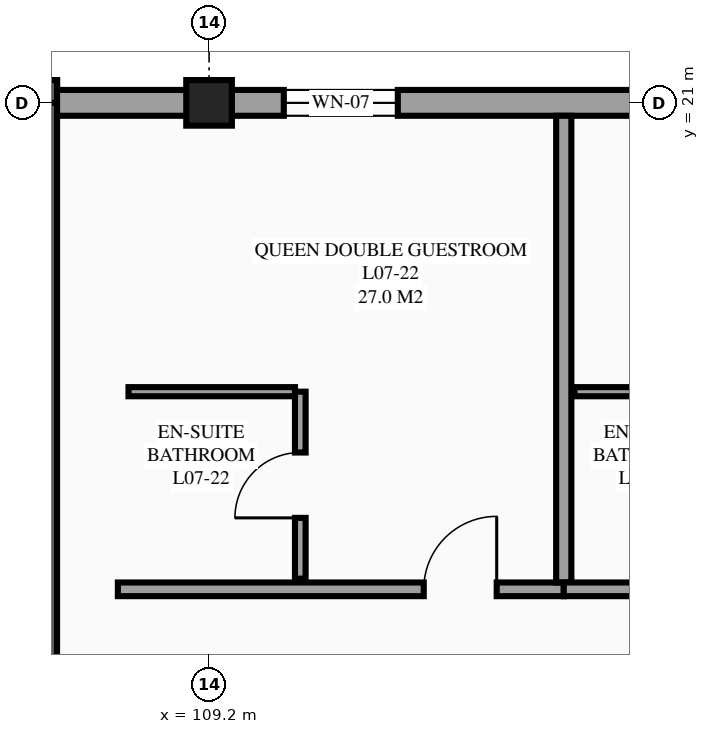
"""IFC4 building model, lengths in metres.
Left out: names, types, materials, properties, quantities, classifications, styles, units other than length and angle.
Written with IfcOpenShell. Run it as: python <this file> out.ifc"""

import sys

from ifc_helpers import new_model, si_unit, direction, frame, frame_2d, origin, origin_2d, place, context, subcontext, project, spatial, rectangle, extrude, element, fill, save


model = new_model("IFC4")
c1 = context("Model", 3, precision=1e-05, world=origin(), true_north=direction((0.0, 1.0)))
c2 = subcontext(c1, "Body", "Model", "MODEL_VIEW")
j1 = project(units=[si_unit("LENGTHUNIT", "METRE"), si_unit("PLANEANGLEUNIT", "RADIAN")], contexts=[c1])
p1 = place(None, origin())
s1 = spatial("IfcSite", under=j1, at=p1, CompositionType="ELEMENT")
p2 = place(p1, origin())
s2 = spatial("IfcBuilding", under=s1, at=p2, CompositionType="ELEMENT")
p3 = place(p2, frame((0.0, 0.0, 29.1)))
s3 = spatial("IfcBuildingStorey", under=s2, at=p3, CompositionType="ELEMENT", Elevation=29.1)
p4 = place(p3, frame((109.2, 21.0, 0.0), z_axis=(0.0, 0.0, 1.0), x_axis=(1.0, 0.0, 0.0)))
e1 = element("IfcColumn", 1, at=p4, inside=s3, PredefinedType="COLUMN", context=c2, shape_type="SweptSolid", body=[
    extrude(rectangle(XDim=0.6, YDim=0.6, at=origin_2d()), origin(), (0.0, 0.0, 1.0), 3.6),
])
p5 = place(p3, frame((126.0, 21.0, 0.0), z_axis=(0.0, 0.0, 1.0), x_axis=(-1.0, 0.0, 0.0)))
e2 = element("IfcWall", 2, at=p5, inside=s3, PredefinedType="STANDARD", context=c2, shape_type="SweptSolid", body=[
    extrude(rectangle(XDim=16.8, YDim=0.34, at=frame_2d((8.4, 0.0))), origin(), (0.0, 0.0, 1.0), 2.63),
])
p6 = place(p5, frame((14.317, 0.0, 0.85)))
e3 = element("IfcOpeningElement", 3, at=p6, cuts=e2, PredefinedType="OPENING", context=c2, shape_type="SweptSolid", body=[
    extrude(rectangle(XDim=1.5, YDim=1.5, at=frame_2d((0.75, 0.75))), frame((0.0, 0.18, 0.0), z_axis=(0.0, -1.0, 0.0), x_axis=(1.0, 0.0, 0.0)), (0.0, 0.0, 1.0), 0.36),
])
p7 = place(p5, frame((9.2, 0.0, 0.85)))
e4 = element("IfcOpeningElement", 4, at=p7, cuts=e2, PredefinedType="OPENING", context=c2, shape_type="SweptSolid", body=[
    extrude(rectangle(XDim=1.5, YDim=1.5, at=frame_2d((0.75, 0.75))), frame((0.0, 0.18, 0.0), z_axis=(0.0, -1.0, 0.0), x_axis=(1.0, 0.0, 0.0)), (0.0, 0.0, 1.0), 0.36),
])
p8 = place(p5, frame((2.583, 0.0, 0.85)))
e5 = element("IfcOpeningElement", 5, at=p8, cuts=e2, PredefinedType="OPENING", context=c2, shape_type="SweptSolid", body=[
    extrude(rectangle(XDim=1.5, YDim=1.5, at=frame_2d((0.75, 0.75))), frame((0.0, 0.18, 0.0), z_axis=(0.0, -1.0, 0.0), x_axis=(1.0, 0.0, 0.0)), (0.0, 0.0, 1.0), 0.36),
])
p9 = place(p3, frame((107.05, 12.46, 0.0), z_axis=(0.0, 0.0, 1.0), x_axis=(0.0, 1.0, 0.0)))
e6 = element("IfcWall", 6, at=p9, inside=s3, PredefinedType="SHEAR", context=c2, shape_type="SweptSolid", body=[
    extrude(rectangle(XDim=8.84, YDim=0.3, at=frame_2d((4.42, 0.0))), origin(), (0.0, 0.0, 1.0), 3.6),
])
p10 = place(p3, frame((107.2, 21.15, 0.0), z_axis=(0.0, 0.0, 1.0), x_axis=(-1.0, 0.0, 0.0)))
e7 = element("IfcWall", 7, at=p10, inside=s3, PredefinedType="SHEAR", context=c2, shape_type="SweptSolid", body=[
    extrude(rectangle(XDim=5.2, YDim=0.3, at=frame_2d((2.6, 0.0))), origin(), (0.0, 0.0, 1.0), 3.6),
])
p11 = place(p3, frame((108.0, 14.6, 0.0), z_axis=(0.0, 0.0, 1.0), x_axis=(1.0, 0.0, 0.0)))
e8 = element("IfcWall", 8, at=p11, inside=s3, PredefinedType="PARTITIONING", context=c2, shape_type="SweptSolid", body=[
    extrude(rectangle(XDim=5.867, YDim=0.18, at=frame_2d((2.933, 0.0))), origin(), (0.0, 0.0, 1.0), 3.375),
])
p12 = place(p11, frame((4.024, 0.0, 0.0)))
e9 = element("IfcOpeningElement", 9, at=p12, cuts=e8, PredefinedType="OPENING", context=c2, shape_type="SweptSolid", body=[
    extrude(rectangle(XDim=0.96, YDim=2.15, at=frame_2d((0.48, 1.075))), frame((0.0, 0.1, 0.0), z_axis=(0.0, -1.0, 0.0), x_axis=(1.0, 0.0, 0.0)), (0.0, 0.0, 1.0), 0.2),
])
p13 = place(p3, frame((113.867, 14.69, 0.0), z_axis=(0.0, 0.0, 1.0), x_axis=(0.0, 1.0, 0.0)))
e10 = element("IfcWall", 10, at=p13, inside=s3, PredefinedType="PARTITIONING", context=c2, shape_type="SweptSolid", body=[
    extrude(rectangle(XDim=6.14, YDim=0.2, at=frame_2d((3.07, 0.0))), origin(), (0.0, 0.0, 1.0), 3.375),
])
p14 = place(p3, frame((110.4, 14.74, 0.0), z_axis=(0.0, 0.0, 1.0), x_axis=(0.0, 1.0, 0.0)))
e11 = element("IfcWall", 11, at=p14, inside=s3, PredefinedType="PARTITIONING", context=c2, shape_type="SweptSolid", body=[
    extrude(rectangle(XDim=2.46, YDim=0.14, at=frame_2d((1.23, 0.0))), origin(), (0.0, 0.0, 1.0), 3.375),
])
p15 = place(p14, frame((0.8, 0.0, 0.0)))
e12 = element("IfcOpeningElement", 12, at=p15, cuts=e11, PredefinedType="OPENING", context=c2, shape_type="SweptSolid", body=[
    extrude(rectangle(XDim=0.86, YDim=2.1, at=frame_2d((0.43, 1.05))), frame((0.0, 0.08, 0.0), z_axis=(0.0, -1.0, 0.0), x_axis=(1.0, 0.0, 0.0)), (0.0, 0.0, 1.0), 0.16),
])
p16 = place(p3, frame((108.14, 17.2, 0.0), z_axis=(0.0, 0.0, 1.0), x_axis=(1.0, 0.0, 0.0)))
e13 = element("IfcWall", 13, at=p16, inside=s3, PredefinedType="PARTITIONING", context=c2, shape_type="SweptSolid", body=[
    extrude(rectangle(XDim=2.19, YDim=0.12, at=frame_2d((1.095, 0.0))), origin(), (0.0, 0.0, 1.0), 3.375),
])
p17 = place(p3, frame((113.867, 14.6, 0.0), z_axis=(0.0, 0.0, 1.0), x_axis=(1.0, 0.0, 0.0)))
e14 = element("IfcWall", 14, at=p17, inside=s3, PredefinedType="PARTITIONING", context=c2, shape_type="SweptSolid", body=[
    extrude(rectangle(XDim=5.867, YDim=0.18, at=frame_2d((2.933, 0.0))), origin(), (0.0, 0.0, 1.0), 3.375),
])
p18 = place(p17, frame((4.024, 0.0, 0.0)))
e15 = element("IfcOpeningElement", 15, at=p18, cuts=e14, PredefinedType="OPENING", context=c2, shape_type="SweptSolid", body=[
    extrude(rectangle(XDim=0.96, YDim=2.15, at=frame_2d((0.48, 1.075))), frame((0.0, 0.1, 0.0), z_axis=(0.0, -1.0, 0.0), x_axis=(1.0, 0.0, 0.0)), (0.0, 0.0, 1.0), 0.2),
])
p19 = place(p3, frame((114.007, 17.2, 0.0), z_axis=(0.0, 0.0, 1.0), x_axis=(1.0, 0.0, 0.0)))
e16 = element("IfcWall", 16, at=p19, inside=s3, PredefinedType="PARTITIONING", context=c2, shape_type="SweptSolid", body=[
    extrude(rectangle(XDim=2.19, YDim=0.12, at=frame_2d((1.095, 0.0))), origin(), (0.0, 0.0, 1.0), 3.375),
])
p20 = place(p3, frame((109.2, 21.0, 0.0), z_axis=(0.0, 0.0, 1.0), x_axis=(-1.0, 0.0, 0.0)))
e17 = element("IfcWall", 17, at=p20, inside=s3, PredefinedType="STANDARD", context=c2, shape_type="SweptSolid", body=[
    extrude(rectangle(XDim=2.0, YDim=0.34, at=frame_2d((1.0, 0.0))), origin(), (0.0, 0.0, 1.0), 3.126),
])
p21 = place(p6, origin())
e18 = element("IfcWindow", 18, at=p21, inside=s3, PartitioningType="SINGLE_PANEL", PredefinedType="WINDOW", context=c2, shape_type="SweptSolid", body=[
    extrude(rectangle(XDim=1.5, YDim=1.5, at=frame_2d((0.75, 0.75))), frame((0.0, 0.03, 0.0), z_axis=(0.0, -1.0, 0.0), x_axis=(1.0, 0.0, 0.0)), (0.0, 0.0, 1.0), 0.06),
])
fill(e3, e18)
p22 = place(p12, origin())
e19 = element("IfcDoor", 19, at=p22, inside=s3, OperationType="SINGLE_SWING_RIGHT", PredefinedType="DOOR", context=c2, shape_type="SweptSolid", body=[
    extrude(rectangle(XDim=0.96, YDim=2.15, at=frame_2d((0.48, 1.075))), frame((0.0, 0.025, 0.0), z_axis=(0.0, -1.0, 0.0), x_axis=(1.0, 0.0, 0.0)), (0.0, 0.0, 1.0), 0.05),
])
fill(e9, e19)
p23 = place(p15, origin())
e20 = element("IfcDoor", 20, at=p23, inside=s3, OperationType="SINGLE_SWING_LEFT", PredefinedType="DOOR", context=c2, shape_type="SweptSolid", body=[
    extrude(rectangle(XDim=0.86, YDim=2.1, at=frame_2d((0.43, 1.05))), frame((0.0, 0.025, 0.0), z_axis=(0.0, -1.0, 0.0), x_axis=(1.0, 0.0, 0.0)), (0.0, 0.0, 1.0), 0.05),
])
fill(e12, e20)
save(model, sys.argv[1])
